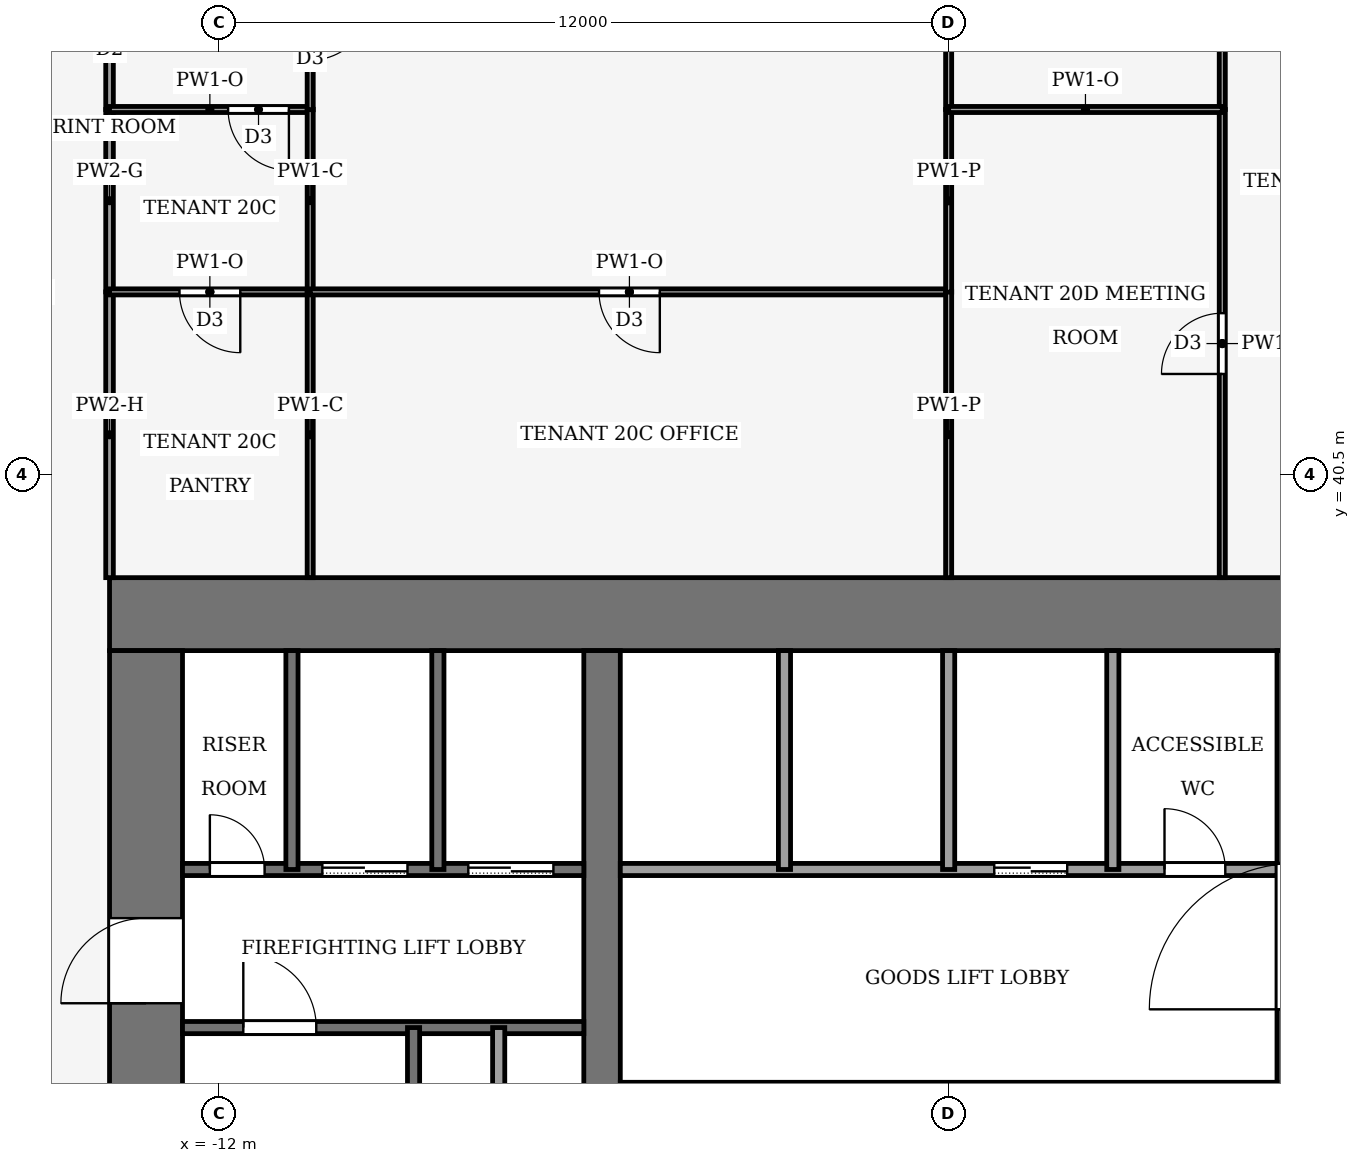
"""IFC4 building model, lengths in metres.
Left out: names, types, materials, properties, quantities, classifications, styles, units other than length and angle.
Written with IfcOpenShell. Run it as: python <this file> out.ifc"""

import sys

from ifc_helpers import new_model, si_unit, direction, frame, frame_2d, origin, place, context, subcontext, project, spatial, rectangle, extrude, element, fill, save


model = new_model("IFC4")
c1 = context("Model", 3, precision=1e-05, world=origin(), true_north=direction((0.0, 1.0)))
c2 = subcontext(c1, "Body", "Model", "MODEL_VIEW")
j1 = project(units=[si_unit("LENGTHUNIT", "METRE"), si_unit("PLANEANGLEUNIT", "RADIAN")], contexts=[c1])
p1 = place(None, origin())
s1 = spatial("IfcSite", under=j1, at=p1, CompositionType="ELEMENT")
p2 = place(p1, origin())
s2 = spatial("IfcBuilding", under=s1, at=p2, CompositionType="ELEMENT")
p3 = place(p2, frame((0.0, 0.0, 90.0)))
s3 = spatial("IfcBuildingStorey", under=s2, at=p3, CompositionType="ELEMENT", Elevation=90.0)
p4 = place(p3, frame((-13.8, 38.2, -0.13), z_axis=(0.0, 0.0, 1.0), x_axis=(1.0, 0.0, 0.0)))
e1 = element("IfcWall", 1, at=p4, inside=s3, PredefinedType="SHEAR", context=c2, shape_type="SweptSolid", body=[
    extrude(rectangle(XDim=27.6, YDim=1.2, at=frame_2d((13.8, 0.0))), origin(), (0.0, 0.0, 1.0), 4.0),
])
p5 = place(p3, frame((-13.2, 18.4, -0.13), z_axis=(0.0, 0.0, 1.0), x_axis=(0.0, 1.0, 0.0)))
e2 = element("IfcWall", 2, at=p5, inside=s3, PredefinedType="SHEAR", context=c2, shape_type="SweptSolid", body=[
    extrude(rectangle(XDim=19.2, YDim=1.2, at=frame_2d((9.6, 0.0))), origin(), (0.0, 0.0, 1.0), 4.0),
])
p6 = place(p5, frame((2.8, 0.0, 0.13)))
e3 = element("IfcOpeningElement", 3, at=p6, cuts=e2, PredefinedType="OPENING", context=c2, shape_type="SweptSolid", body=[
    extrude(rectangle(XDim=2.4, YDim=2.4, at=frame_2d((1.2, 1.2))), frame((0.0, 0.61, 0.0), z_axis=(0.0, -1.0, 0.0), x_axis=(1.0, 0.0, 0.0)), (0.0, 0.0, 1.0), 1.22),
])
p7 = place(p5, frame((13.4, 0.0, 0.13)))
e4 = element("IfcOpeningElement", 4, at=p7, cuts=e2, PredefinedType="OPENING", context=c2, shape_type="SweptSolid", body=[
    extrude(rectangle(XDim=1.4, YDim=2.2, at=frame_2d((0.7, 1.1))), frame((0.0, 0.61, 0.0), z_axis=(0.0, -1.0, 0.0), x_axis=(1.0, 0.0, 0.0)), (0.0, 0.0, 1.0), 1.22),
])
p8 = place(p3, frame((-5.7, 18.4, -0.13), z_axis=(0.0, 0.0, 1.0), x_axis=(0.0, 1.0, 0.0)))
e5 = element("IfcWall", 5, at=p8, inside=s3, PredefinedType="SHEAR", context=c2, shape_type="SweptSolid", body=[
    extrude(rectangle(XDim=19.2, YDim=0.6, at=frame_2d((9.6, 0.0))), origin(), (0.0, 0.0, 1.0), 4.0),
])
p9 = place(p8, frame((8.35, 0.0, 0.13)))
e6 = element("IfcOpeningElement", 6, at=p9, cuts=e5, PredefinedType="OPENING", context=c2, shape_type="SweptSolid", body=[
    extrude(rectangle(XDim=0.9, YDim=2.1, at=frame_2d((0.45, 1.05))), frame((0.0, 0.31, 0.0), z_axis=(0.0, -1.0, 0.0), x_axis=(1.0, 0.0, 0.0)), (0.0, 0.0, 1.0), 0.62),
])
p10 = place(p3, frame((5.7, 18.4, -0.13), z_axis=(0.0, 0.0, 1.0), x_axis=(0.0, 1.0, 0.0)))
e7 = element("IfcWall", 7, at=p10, inside=s3, PredefinedType="SHEAR", context=c2, shape_type="SweptSolid", body=[
    extrude(rectangle(XDim=19.2, YDim=0.6, at=frame_2d((9.6, 0.0))), origin(), (0.0, 0.0, 1.0), 4.0),
])
p11 = place(p10, frame((8.35, 0.0, 0.13)))
e8 = element("IfcOpeningElement", 8, at=p11, cuts=e7, PredefinedType="OPENING", context=c2, shape_type="SweptSolid", body=[
    extrude(rectangle(XDim=0.9, YDim=2.1, at=frame_2d((0.45, 1.05))), frame((0.0, 0.31, 0.0), z_axis=(0.0, -1.0, 0.0), x_axis=(1.0, 0.0, 0.0)), (0.0, 0.0, 1.0), 0.62),
])
p12 = place(p10, frame((13.3, 0.0, 0.13)))
e9 = element("IfcOpeningElement", 9, at=p12, cuts=e7, PredefinedType="OPENING", context=c2, shape_type="SweptSolid", body=[
    extrude(rectangle(XDim=2.4, YDim=2.4, at=frame_2d((1.2, 1.2))), frame((0.0, 0.31, 0.0), z_axis=(0.0, -1.0, 0.0), x_axis=(1.0, 0.0, 0.0)), (0.0, 0.0, 1.0), 0.62),
])
p13 = place(p3, frame((-12.6, 31.4, 0.0), z_axis=(0.0, 0.0, 1.0), x_axis=(1.0, 0.0, 0.0)))
e10 = element("IfcWall", 10, at=p13, inside=s3, PredefinedType="PARTITIONING", context=c2, shape_type="SweptSolid", body=[
    extrude(rectangle(XDim=6.6, YDim=0.2, at=frame_2d((3.3, 0.0))), origin(), (0.0, 0.0, 1.0), 3.87),
])
p14 = place(p13, frame((1.0, 0.0, 0.0)))
e11 = element("IfcOpeningElement", 11, at=p14, cuts=e10, PredefinedType="OPENING", context=c2, shape_type="SweptSolid", body=[
    extrude(rectangle(XDim=1.2, YDim=2.2, at=frame_2d((0.6, 1.1))), frame((0.0, 0.11, 0.0), z_axis=(0.0, -1.0, 0.0), x_axis=(1.0, 0.0, 0.0)), (0.0, 0.0, 1.0), 0.22),
])
p15 = place(p3, frame((-12.6, 34.0, 0.0), z_axis=(0.0, 0.0, 1.0), x_axis=(1.0, 0.0, 0.0)))
e12 = element("IfcWall", 12, at=p15, inside=s3, PredefinedType="PARTITIONING", context=c2, shape_type="SweptSolid", body=[
    extrude(rectangle(XDim=6.6, YDim=0.2, at=frame_2d((3.3, 0.0))), origin(), (0.0, 0.0, 1.0), 3.87),
])
p16 = place(p15, frame((4.7, 0.0, 0.0)))
e13 = element("IfcOpeningElement", 13, at=p16, cuts=e12, PredefinedType="OPENING", context=c2, shape_type="SweptSolid", body=[
    extrude(rectangle(XDim=1.4, YDim=2.2, at=frame_2d((0.7, 1.1))), frame((0.0, 0.11, 0.0), z_axis=(0.0, -1.0, 0.0), x_axis=(1.0, 0.0, 0.0)), (0.0, 0.0, 1.0), 0.22),
])
p17 = place(p15, frame((2.3, 0.0, 0.0)))
e14 = element("IfcOpeningElement", 14, at=p17, cuts=e12, PredefinedType="OPENING", context=c2, shape_type="SweptSolid", body=[
    extrude(rectangle(XDim=1.4, YDim=2.2, at=frame_2d((0.7, 1.1))), frame((0.0, 0.11, 0.0), z_axis=(0.0, -1.0, 0.0), x_axis=(1.0, 0.0, 0.0)), (0.0, 0.0, 1.0), 0.22),
])
p18 = place(p15, frame((0.45, 0.0, 0.0)))
e15 = element("IfcOpeningElement", 15, at=p18, cuts=e12, PredefinedType="OPENING", context=c2, shape_type="SweptSolid", body=[
    extrude(rectangle(XDim=0.9, YDim=2.1, at=frame_2d((0.45, 1.05))), frame((0.0, 0.11, 0.0), z_axis=(0.0, -1.0, 0.0), x_axis=(1.0, 0.0, 0.0)), (0.0, 0.0, 1.0), 0.22),
])
p19 = place(p3, frame((-5.4, 34.0, 0.0), z_axis=(0.0, 0.0, 1.0), x_axis=(1.0, 0.0, 0.0)))
e16 = element("IfcWall", 16, at=p19, inside=s3, PredefinedType="PARTITIONING", context=c2, shape_type="SweptSolid", body=[
    extrude(rectangle(XDim=10.8, YDim=0.2, at=frame_2d((5.4, 0.0))), origin(), (0.0, 0.0, 1.0), 3.87),
])
p20 = place(p19, frame((6.15, 0.0, 0.0)))
e17 = element("IfcOpeningElement", 17, at=p20, cuts=e16, PredefinedType="OPENING", context=c2, shape_type="SweptSolid", body=[
    extrude(rectangle(XDim=1.2, YDim=2.2, at=frame_2d((0.6, 1.1))), frame((0.0, 0.11, 0.0), z_axis=(0.0, -1.0, 0.0), x_axis=(1.0, 0.0, 0.0)), (0.0, 0.0, 1.0), 0.22),
])
p21 = place(p19, frame((8.95, 0.0, 0.0)))
e18 = element("IfcOpeningElement", 18, at=p21, cuts=e16, PredefinedType="OPENING", context=c2, shape_type="SweptSolid", body=[
    extrude(rectangle(XDim=1.0, YDim=2.1, at=frame_2d((0.5, 1.05))), frame((0.0, 0.11, 0.0), z_axis=(0.0, -1.0, 0.0), x_axis=(1.0, 0.0, 0.0)), (0.0, 0.0, 1.0), 0.22),
])
p22 = place(p3, frame((-10.8, 34.0, 0.0), z_axis=(0.0, 0.0, 1.0), x_axis=(0.0, 1.0, 0.0)))
e19 = element("IfcWall", 19, at=p22, inside=s3, PredefinedType="PARTITIONING", context=c2, shape_type="SweptSolid", body=[
    extrude(rectangle(XDim=3.6, YDim=0.2, at=frame_2d((1.8, 0.0))), origin(), (0.0, 0.0, 1.0), 3.87),
])
p23 = place(p3, frame((-8.8, 24.0, 0.0), z_axis=(0.0, 0.0, 1.0), x_axis=(0.0, 1.0, 0.0)))
e20 = element("IfcWall", 20, at=p23, inside=s3, PredefinedType="PARTITIONING", context=c2, shape_type="SweptSolid", body=[
    extrude(rectangle(XDim=7.4, YDim=0.2, at=frame_2d((3.7, 0.0))), origin(), (0.0, 0.0, 1.0), 3.87),
])
p24 = place(p3, frame((-8.4, 34.0, 0.0), z_axis=(0.0, 0.0, 1.0), x_axis=(0.0, 1.0, 0.0)))
e21 = element("IfcWall", 21, at=p24, inside=s3, PredefinedType="PARTITIONING", context=c2, shape_type="SweptSolid", body=[
    extrude(rectangle(XDim=3.6, YDim=0.2, at=frame_2d((1.8, 0.0))), origin(), (0.0, 0.0, 1.0), 3.87),
])
p25 = place(p3, frame((-7.4, 24.0, 0.0), z_axis=(0.0, 0.0, 1.0), x_axis=(0.0, 1.0, 0.0)))
e22 = element("IfcWall", 22, at=p25, inside=s3, PredefinedType="PARTITIONING", context=c2, shape_type="SweptSolid", body=[
    extrude(rectangle(XDim=7.4, YDim=0.2, at=frame_2d((3.7, 0.0))), origin(), (0.0, 0.0, 1.0), 3.87),
])
for number, where, z_axis, x_axis in (
    (23, (-2.7, 34.0, 0.0), (0.0, 0.0, 1.0), (0.0, 1.0, 0.0)),
    (24, (0.0, 34.0, 0.0), (0.0, 0.0, 1.0), (0.0, 1.0, 0.0)),
    (25, (2.7, 34.0, 0.0), (0.0, 0.0, 1.0), (0.0, 1.0, 0.0)),
):
    element("IfcWall", number, at=place(p3, frame(where, z_axis=z_axis, x_axis=x_axis)), inside=s3, PredefinedType="PARTITIONING", context=c2, shape_type="SweptSolid", body=[
        extrude(rectangle(XDim=3.6, YDim=0.2, at=frame_2d((1.8, 0.0))), origin(), (0.0, 0.0, 1.0), 3.87),
    ])
p26 = place(p3, frame((-13.8, 38.8, 0.0), z_axis=(0.0, 0.0, 1.0), x_axis=(0.0, 1.0, 0.0)))
e26 = element("IfcWall", 26, at=p26, inside=s3, PredefinedType="PARTITIONING", context=c2, shape_type="SweptSolid", body=[
    extrude(rectangle(XDim=4.7, YDim=0.125, at=frame_2d((2.35, 0.0))), origin(), (0.0, 0.0, 1.0), 3.14),
])
p27 = place(p3, frame((-13.8, 43.5, 0.0), z_axis=(0.0, 0.0, 1.0), x_axis=(0.0, 1.0, 0.0)))
e27 = element("IfcWall", 27, at=p27, inside=s3, PredefinedType="PARTITIONING", context=c2, shape_type="SweptSolid", body=[
    extrude(rectangle(XDim=3.0, YDim=0.125, at=frame_2d((1.5, 0.0))), origin(), (0.0, 0.0, 1.0), 3.87),
])
p28 = place(p3, frame((-13.8, 52.73, 0.0), z_axis=(0.0, 0.0, 1.0), x_axis=(0.0, -1.0, 0.0)))
e28 = element("IfcWall", 28, at=p28, inside=s3, PredefinedType="PARTITIONING", context=c2, shape_type="SweptSolid", body=[
    extrude(rectangle(XDim=6.23, YDim=0.125, at=frame_2d((3.115, 0.0))), origin(), (0.0, 0.0, 1.0), 3.04),
])
p29 = place(p28, frame((4.28, 0.0, 0.0)))
e29 = element("IfcOpeningElement", 29, at=p29, cuts=e28, PredefinedType="OPENING", context=c2, shape_type="SweptSolid", body=[
    extrude(rectangle(XDim=1.0, YDim=2.1, at=frame_2d((0.5, 1.05))), frame((0.0, 0.073, 0.0), z_axis=(0.0, -1.0, 0.0), x_axis=(1.0, 0.0, 0.0)), (0.0, 0.0, 1.0), 0.145),
])
p30 = place(p3, frame((-10.5, 43.5, 0.0), z_axis=(0.0, 0.0, 1.0), x_axis=(-1.0, 0.0, 0.0)))
e30 = element("IfcWall", 30, at=p30, inside=s3, PredefinedType="PARTITIONING", context=c2, shape_type="SweptSolid", body=[
    extrude(rectangle(XDim=3.3, YDim=0.1, at=frame_2d((1.65, 0.0))), origin(), (0.0, 0.0, 1.0), 3.39),
])
p31 = place(p30, frame((1.15, 0.0, 0.0)))
e31 = element("IfcOpeningElement", 31, at=p31, cuts=e30, PredefinedType="OPENING", context=c2, shape_type="SweptSolid", body=[
    extrude(rectangle(XDim=1.0, YDim=2.1, at=frame_2d((0.5, 1.05))), frame((0.0, 0.06, 0.0), z_axis=(0.0, -1.0, 0.0), x_axis=(1.0, 0.0, 0.0)), (0.0, 0.0, 1.0), 0.12),
])
p32 = place(p3, frame((-10.5, 38.8, 0.0), z_axis=(0.0, 0.0, 1.0), x_axis=(0.0, 1.0, 0.0)))
e32 = element("IfcWall", 32, at=p32, inside=s3, PredefinedType="PARTITIONING", context=c2, shape_type="SweptSolid", body=[
    extrude(rectangle(XDim=4.7, YDim=0.1, at=frame_2d((2.35, 0.0))), origin(), (0.0, 0.0, 1.0), 3.87),
])
p33 = place(p3, frame((-10.5, 46.5, 0.0), z_axis=(0.0, 0.0, 1.0), x_axis=(-1.0, 0.0, 0.0)))
e33 = element("IfcWall", 33, at=p33, inside=s3, PredefinedType="PARTITIONING", context=c2, shape_type="SweptSolid", body=[
    extrude(rectangle(XDim=3.3, YDim=0.1, at=frame_2d((1.65, 0.0))), origin(), (0.0, 0.0, 1.0), 3.39),
])
p34 = place(p33, frame((0.35, 0.0, 0.0)))
e34 = element("IfcOpeningElement", 34, at=p34, cuts=e33, PredefinedType="OPENING", context=c2, shape_type="SweptSolid", body=[
    extrude(rectangle(XDim=1.0, YDim=2.1, at=frame_2d((0.5, 1.05))), frame((0.0, 0.06, 0.0), z_axis=(0.0, -1.0, 0.0), x_axis=(1.0, 0.0, 0.0)), (0.0, 0.0, 1.0), 0.12),
])
p35 = place(p3, frame((-10.5, 43.5, 0.0), z_axis=(0.0, 0.0, 1.0), x_axis=(0.0, 1.0, 0.0)))
e35 = element("IfcWall", 35, at=p35, inside=s3, PredefinedType="PARTITIONING", context=c2, shape_type="SweptSolid", body=[
    extrude(rectangle(XDim=3.004, YDim=0.1, at=frame_2d((1.502, 0.0))), origin(), (0.0, 0.0, 1.0), 3.87),
])
p36 = place(p3, frame((-10.5, 52.455, 0.0), z_axis=(0.0, 0.0, 1.0), x_axis=(0.0, -1.0, 0.0)))
e36 = element("IfcWall", 36, at=p36, inside=s3, PredefinedType="PARTITIONING", context=c2, shape_type="SweptSolid", body=[
    extrude(rectangle(XDim=5.959, YDim=0.1, at=frame_2d((2.979, 0.0))), origin(), (0.0, 0.0, 1.0), 3.04),
])
p37 = place(p36, frame((4.145, 0.0, 0.0)))
e37 = element("IfcOpeningElement", 37, at=p37, cuts=e36, PredefinedType="OPENING", context=c2, shape_type="SweptSolid", body=[
    extrude(rectangle(XDim=1.0, YDim=2.1, at=frame_2d((0.5, 1.05))), frame((0.0, 0.06, 0.0), z_axis=(0.0, -1.0, 0.0), x_axis=(1.0, 0.0, 0.0)), (0.0, 0.0, 1.0), 0.12),
])
p38 = place(p3, frame((0.0, 43.5, 0.0), z_axis=(0.0, 0.0, 1.0), x_axis=(-1.0, 0.0, 0.0)))
e38 = element("IfcWall", 38, at=p38, inside=s3, PredefinedType="PARTITIONING", context=c2, shape_type="SweptSolid", body=[
    extrude(rectangle(XDim=10.5, YDim=0.1, at=frame_2d((5.25, 0.0))), origin(), (0.0, 0.0, 1.0), 3.39),
])
p39 = place(p38, frame((4.75, 0.0, 0.0)))
e39 = element("IfcOpeningElement", 39, at=p39, cuts=e38, PredefinedType="OPENING", context=c2, shape_type="SweptSolid", body=[
    extrude(rectangle(XDim=1.0, YDim=2.1, at=frame_2d((0.5, 1.05))), frame((0.0, 0.06, 0.0), z_axis=(0.0, -1.0, 0.0), x_axis=(1.0, 0.0, 0.0)), (0.0, 0.0, 1.0), 0.12),
])
p40 = place(p3, frame((0.0, 38.8, 0.0), z_axis=(0.0, 0.0, 1.0), x_axis=(0.0, 1.0, 0.0)))
e40 = element("IfcWall", 40, at=p40, inside=s3, PredefinedType="PARTITIONING", context=c2, shape_type="SweptSolid", body=[
    extrude(rectangle(XDim=4.704, YDim=0.1, at=frame_2d((2.352, 0.0))), origin(), (0.0, 0.0, 1.0), 3.44),
])
p41 = place(p3, frame((0.0, 43.496, 0.0), z_axis=(0.0, 0.0, 1.0), x_axis=(0.0, 1.0, 0.0)))
e41 = element("IfcWall", 41, at=p41, inside=s3, PredefinedType="PARTITIONING", context=c2, shape_type="SweptSolid", body=[
    extrude(rectangle(XDim=3.004, YDim=0.1, at=frame_2d((1.502, 0.0))), origin(), (0.0, 0.0, 1.0), 3.44),
])
p42 = place(p3, frame((0.0, 46.5, 0.0), z_axis=(0.0, 0.0, 1.0), x_axis=(0.0, 1.0, 0.0)))
e42 = element("IfcWall", 42, at=p42, inside=s3, PredefinedType="PARTITIONING", context=c2, shape_type="SweptSolid", body=[
    extrude(rectangle(XDim=5.08, YDim=0.1, at=frame_2d((2.54, 0.0))), origin(), (0.0, 0.0, 1.0), 3.04),
])
p43 = place(p3, frame((4.5, 38.8, 0.0), z_axis=(0.0, 0.0, 1.0), x_axis=(0.0, 1.0, 0.0)))
e43 = element("IfcWall", 43, at=p43, inside=s3, PredefinedType="PARTITIONING", context=c2, shape_type="SweptSolid", body=[
    extrude(rectangle(XDim=7.7, YDim=0.1, at=frame_2d((3.85, 0.0))), origin(), (0.0, 0.0, 1.0), 3.87),
])
p44 = place(p43, frame((3.35, 0.0, 0.0)))
e44 = element("IfcOpeningElement", 44, at=p44, cuts=e43, PredefinedType="OPENING", context=c2, shape_type="SweptSolid", body=[
    extrude(rectangle(XDim=1.0, YDim=2.1, at=frame_2d((0.5, 1.05))), frame((0.0, 0.06, 0.0), z_axis=(0.0, -1.0, 0.0), x_axis=(1.0, 0.0, 0.0)), (0.0, 0.0, 1.0), 0.12),
])
p45 = place(p3, frame((4.5, 46.5, 0.0), z_axis=(0.0, 0.0, 1.0), x_axis=(0.0, 1.0, 0.0)))
e45 = element("IfcWall", 45, at=p45, inside=s3, PredefinedType="PARTITIONING", context=c2, shape_type="SweptSolid", body=[
    extrude(rectangle(XDim=5.455, YDim=0.1, at=frame_2d((2.728, 0.0))), origin(), (0.0, 0.0, 1.0), 3.04),
])
p46 = place(p45, frame((2.162, 0.0, 0.0)))
e46 = element("IfcOpeningElement", 46, at=p46, cuts=e45, PredefinedType="OPENING", context=c2, shape_type="SweptSolid", body=[
    extrude(rectangle(XDim=1.0, YDim=2.1, at=frame_2d((0.5, 1.05))), frame((0.0, 0.06, 0.0), z_axis=(0.0, -1.0, 0.0), x_axis=(1.0, 0.0, 0.0)), (0.0, 0.0, 1.0), 0.12),
])
p47 = place(p3, frame((4.5, 46.5, 0.0), z_axis=(0.0, 0.0, 1.0), x_axis=(-1.0, 0.0, 0.0)))
e47 = element("IfcWall", 47, at=p47, inside=s3, PredefinedType="PARTITIONING", context=c2, shape_type="SweptSolid", body=[
    extrude(rectangle(XDim=4.5, YDim=0.1, at=frame_2d((2.25, 0.0))), origin(), (0.0, 0.0, 1.0), 3.39),
])
p48 = place(p20, origin())
e48 = element("IfcDoor", 48, at=p48, inside=s3, OperationType="SLIDING_TO_LEFT", PredefinedType="DOOR", context=c2, shape_type="SweptSolid", body=[
    extrude(rectangle(XDim=1.2, YDim=2.2, at=frame_2d((0.6, 1.1))), frame((0.0, 0.025, 0.0), z_axis=(0.0, -1.0, 0.0), x_axis=(1.0, 0.0, 0.0)), (0.0, 0.0, 1.0), 0.05),
])
fill(e17, e48)
p49 = place(p16, origin())
e49 = element("IfcDoor", 49, at=p49, inside=s3, OperationType="SLIDING_TO_LEFT", PredefinedType="DOOR", context=c2, shape_type="SweptSolid", body=[
    extrude(rectangle(XDim=1.4, YDim=2.2, at=frame_2d((0.7, 1.1))), frame((0.0, 0.025, 0.0), z_axis=(0.0, -1.0, 0.0), x_axis=(1.0, 0.0, 0.0)), (0.0, 0.0, 1.0), 0.05),
])
fill(e13, e49)
p50 = place(p17, origin())
e50 = element("IfcDoor", 50, at=p50, inside=s3, OperationType="SLIDING_TO_LEFT", PredefinedType="DOOR", context=c2, shape_type="SweptSolid", body=[
    extrude(rectangle(XDim=1.4, YDim=2.2, at=frame_2d((0.7, 1.1))), frame((0.0, 0.025, 0.0), z_axis=(0.0, -1.0, 0.0), x_axis=(1.0, 0.0, 0.0)), (0.0, 0.0, 1.0), 0.05),
])
fill(e14, e50)
p51 = place(p18, origin())
e51 = element("IfcDoor", 51, at=p51, inside=s3, OperationType="SINGLE_SWING_RIGHT", PredefinedType="DOOR", context=c2, shape_type="SweptSolid", body=[
    extrude(rectangle(XDim=0.9, YDim=2.1, at=frame_2d((0.45, 1.05))), frame((0.0, 0.025, 0.0), z_axis=(0.0, -1.0, 0.0), x_axis=(1.0, 0.0, 0.0)), (0.0, 0.0, 1.0), 0.05),
])
fill(e15, e51)
p52 = place(p21, origin())
e52 = element("IfcDoor", 52, at=p52, inside=s3, OperationType="SINGLE_SWING_LEFT", PredefinedType="DOOR", context=c2, shape_type="SweptSolid", body=[
    extrude(rectangle(XDim=1.0, YDim=2.1, at=frame_2d((0.5, 1.05))), frame((0.0, 0.025, 0.0), z_axis=(0.0, -1.0, 0.0), x_axis=(1.0, 0.0, 0.0)), (0.0, 0.0, 1.0), 0.05),
])
fill(e18, e52)
p53 = place(p14, origin())
e53 = element("IfcDoor", 53, at=p53, inside=s3, OperationType="SINGLE_SWING_RIGHT", PredefinedType="DOOR", context=c2, shape_type="SweptSolid", body=[
    extrude(rectangle(XDim=1.2, YDim=2.2, at=frame_2d((0.6, 1.1))), frame((0.0, 0.025, 0.0), z_axis=(0.0, -1.0, 0.0), x_axis=(1.0, 0.0, 0.0)), (0.0, 0.0, 1.0), 0.05),
])
fill(e11, e53)
p54 = place(p7, origin())
e54 = element("IfcDoor", 54, at=p54, inside=s3, OperationType="SINGLE_SWING_RIGHT", PredefinedType="DOOR", context=c2, shape_type="SweptSolid", body=[
    extrude(rectangle(XDim=1.4, YDim=2.2, at=frame_2d((0.7, 1.1))), frame((0.0, 0.025, 0.0), z_axis=(0.0, -1.0, 0.0), x_axis=(1.0, 0.0, 0.0)), (0.0, 0.0, 1.0), 0.05),
])
fill(e4, e54)
p55 = place(p31, origin())
e55 = element("IfcDoor", 55, at=p55, inside=s3, OperationType="SINGLE_SWING_LEFT", PredefinedType="DOOR", context=c2, shape_type="SweptSolid", body=[
    extrude(rectangle(XDim=1.0, YDim=2.1, at=frame_2d((0.5, 1.05))), frame((0.0, 0.025, 0.0), z_axis=(0.0, -1.0, 0.0), x_axis=(1.0, 0.0, 0.0)), (0.0, 0.0, 1.0), 0.05),
])
fill(e31, e55)
p56 = place(p34, origin())
e56 = element("IfcDoor", 56, at=p56, inside=s3, OperationType="SINGLE_SWING_LEFT", PredefinedType="DOOR", context=c2, shape_type="SweptSolid", body=[
    extrude(rectangle(XDim=1.0, YDim=2.1, at=frame_2d((0.5, 1.05))), frame((0.0, 0.025, 0.0), z_axis=(0.0, -1.0, 0.0), x_axis=(1.0, 0.0, 0.0)), (0.0, 0.0, 1.0), 0.05),
])
fill(e34, e56)
p57 = place(p37, origin())
e57 = element("IfcDoor", 57, at=p57, inside=s3, OperationType="SINGLE_SWING_RIGHT", PredefinedType="DOOR", context=c2, shape_type="SweptSolid", body=[
    extrude(rectangle(XDim=1.0, YDim=2.1, at=frame_2d((0.5, 1.05))), frame((0.0, 0.025, 0.0), z_axis=(0.0, -1.0, 0.0), x_axis=(1.0, 0.0, 0.0)), (0.0, 0.0, 1.0), 0.05),
])
fill(e37, e57)
p58 = place(p39, origin())
e58 = element("IfcDoor", 58, at=p58, inside=s3, OperationType="SINGLE_SWING_RIGHT", PredefinedType="DOOR", context=c2, shape_type="SweptSolid", body=[
    extrude(rectangle(XDim=1.0, YDim=2.1, at=frame_2d((0.5, 1.05))), frame((0.0, 0.025, 0.0), z_axis=(0.0, -1.0, 0.0), x_axis=(1.0, 0.0, 0.0)), (0.0, 0.0, 1.0), 0.05),
])
fill(e39, e58)
p59 = place(p44, origin())
e59 = element("IfcDoor", 59, at=p59, inside=s3, OperationType="SINGLE_SWING_LEFT", PredefinedType="DOOR", context=c2, shape_type="SweptSolid", body=[
    extrude(rectangle(XDim=1.0, YDim=2.1, at=frame_2d((0.5, 1.05))), frame((0.0, 0.025, 0.0), z_axis=(0.0, -1.0, 0.0), x_axis=(1.0, 0.0, 0.0)), (0.0, 0.0, 1.0), 0.05),
])
fill(e44, e59)
save(model, sys.argv[1])
